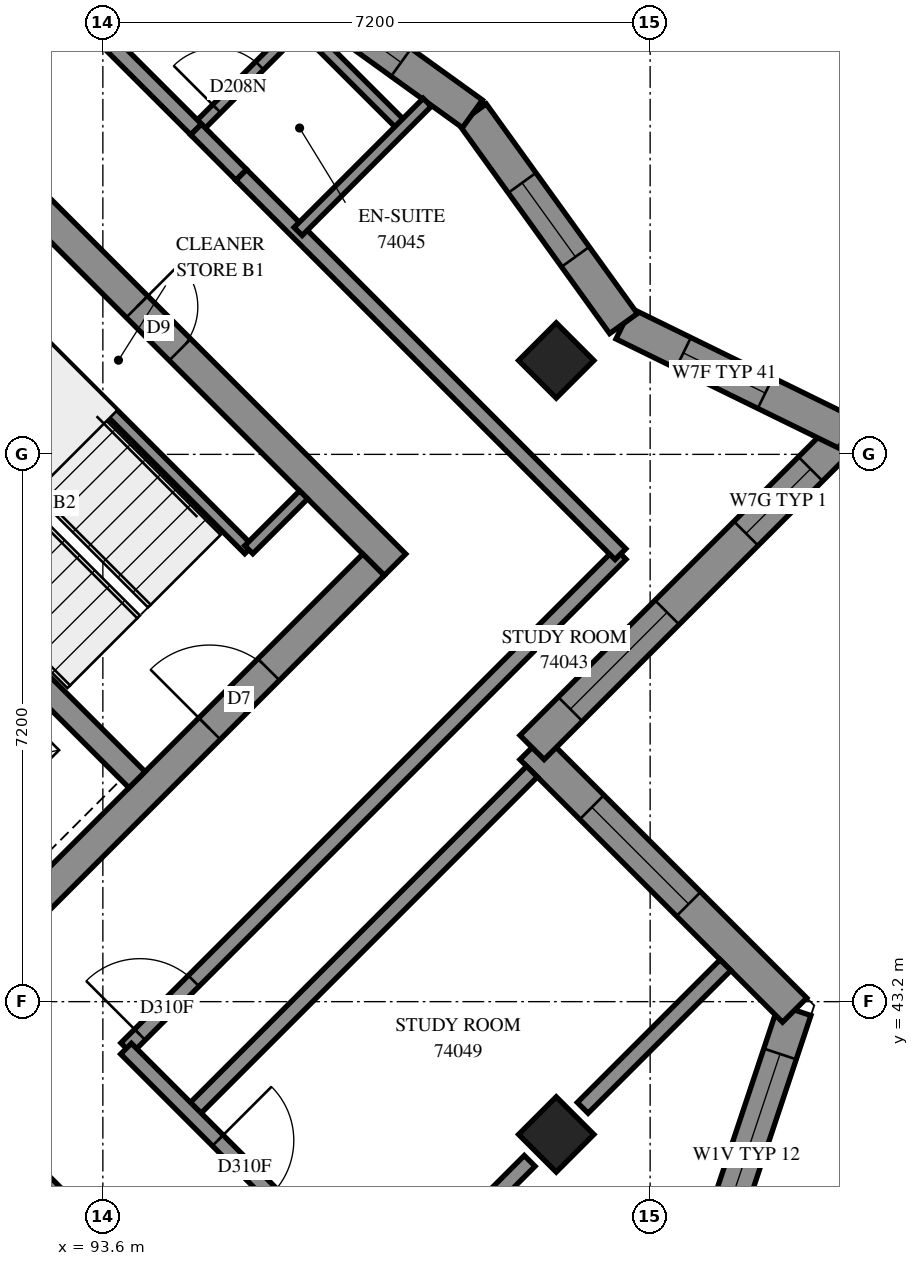
"""IFC4 building model, lengths in metres.
Left out: names, types, materials, properties, quantities, classifications, styles, units other than length and angle.
Written with IfcOpenShell. Run it as: python <this file> out.ifc"""

import sys

from ifc_helpers import new_model, si_unit, direction, frame, frame_2d, origin, origin_2d, place, context, subcontext, project, spatial, polyline, rectangle, outline, extrude, element, fill, save


model = new_model("IFC4")
c1 = context("Model", 3, precision=1e-05, world=origin(), true_north=direction((0.0, 1.0)))
c2 = subcontext(c1, "Body", "Model", "MODEL_VIEW")
j1 = project(units=[si_unit("LENGTHUNIT", "METRE"), si_unit("PLANEANGLEUNIT", "RADIAN")], contexts=[c1])
p1 = place(None, origin())
s1 = spatial("IfcSite", under=j1, at=p1, CompositionType="ELEMENT")
p2 = place(p1, origin())
s2 = spatial("IfcBuilding", under=s1, at=p2, CompositionType="ELEMENT")
p3 = place(p2, frame((0.0, 0.0, 271.0)))
s3 = spatial("IfcBuildingStorey", under=s2, at=p3, CompositionType="ELEMENT", Elevation=271.0)
for number, where, z_axis, x_axis in (
    (1, (99.565, 51.635, 0.0), (0.0, 0.0, 1.0), (0.707, -0.707, 0.0)),
    (2, (99.565, 41.453, 0.0), (0.0, 0.0, 1.0), (0.707, -0.707, 0.0)),
):
    element("IfcColumn", number, at=place(p3, frame(where, z_axis=z_axis, x_axis=x_axis)), inside=s3, PredefinedType="COLUMN", context=c2, shape_type="SweptSolid", body=[
        extrude(rectangle(XDim=0.7, YDim=0.7, at=origin_2d()), origin(), (0.0, 0.0, 1.0), 3.1),
    ])
p4 = place(p3, frame((86.695, 59.696, -0.3), z_axis=(0.0, 0.0, 1.0), x_axis=(0.7071100706, -0.7071034917, 0.0)))
e3 = element("IfcWall", 3, at=p4, inside=s3, PredefinedType="SHEAR", context=c2, shape_type="SweptSolid", body=[
    extrude(rectangle(XDim=15.2, YDim=0.4, at=frame_2d((7.6, 0.0))), origin(), (0.0, 0.0, 1.0), 2.7),
])
p5 = place(p4, frame((10.4, 0.0, 0.3)))
e4 = element("IfcOpeningElement", 4, at=p5, cuts=e3, PredefinedType="OPENING", context=c2, shape_type="SweptSolid", body=[
    extrude(rectangle(XDim=0.8, YDim=2.1, at=frame_2d((0.4, 1.05))), frame((0.0, 0.21, 0.0), z_axis=(0.0, -1.0, 0.0), x_axis=(1.0, 0.0, 0.0)), (0.0, 0.0, 1.0), 0.42),
])
p6 = place(p3, frame((86.978, 38.766, -0.3), z_axis=(0.0, 0.0, 1.0), x_axis=(0.7071067812, 0.7071067812, 0.0)))
e5 = element("IfcWall", 5, at=p6, inside=s3, PredefinedType="SHEAR", context=c2, shape_type="SweptSolid", body=[
    extrude(rectangle(XDim=14.4, YDim=0.4, at=frame_2d((7.2, 0.0))), origin(), (0.0, 0.0, 1.0), 2.7),
])
p7 = place(p6, frame((4.55, 0.0, 0.3)))
e6 = element("IfcOpeningElement", 6, at=p7, cuts=e5, PredefinedType="OPENING", context=c2, shape_type="SweptSolid", body=[
    extrude(rectangle(XDim=1.1, YDim=2.1, at=frame_2d((0.55, 1.05))), frame((0.0, 0.21, 0.0), z_axis=(0.0, -1.0, 0.0), x_axis=(1.0, 0.0, 0.0)), (0.0, 0.0, 1.0), 0.42),
])
p8 = place(p6, frame((11.35, 0.0, 0.3)))
e7 = element("IfcOpeningElement", 7, at=p8, cuts=e5, PredefinedType="OPENING", context=c2, shape_type="SweptSolid", body=[
    extrude(rectangle(XDim=1.1, YDim=2.1, at=frame_2d((0.55, 1.05))), frame((0.0, 0.21, 0.0), z_axis=(0.0, -1.0, 0.0), x_axis=(1.0, 0.0, 0.0)), (0.0, 0.0, 1.0), 0.42),
])
p9 = place(p3, frame((88.958, 51.211, 0.0), z_axis=(0.0, 0.0, 1.0), x_axis=(0.7070998367, -0.7071137256, 0.0)))
e8 = element("IfcWall", 8, at=p9, inside=s3, PredefinedType="SOLIDWALL", context=c2, shape_type="SweptSolid", body=[
    extrude(rectangle(XDim=7.2, YDim=0.3, at=frame_2d((3.6, 0.0))), origin(), (0.0, 0.0, 1.0), 3.1),
])
p10 = place(p3, frame((101.082, 38.232, 0.0), z_axis=(0.0, 0.0, 1.0), x_axis=(0.316227766, 0.9486832981, 0.0)))
e9 = element("IfcWall", 9, at=p10, inside=s3, PredefinedType="SOLIDWALL", context=c2, shape_type="SweptSolid", body=[
    extrude(outline(polyline([(-0.108, -0.225), (5.259, -0.225), (4.981, 0.225), (0.108, 0.225), (-0.108, -0.225)])), origin(), (0.0, 0.0, 1.0), 3.1),
])
p11 = place(p10, frame((1.711, 0.0, 0.45)))
e10 = element("IfcOpeningElement", 10, at=p11, cuts=e9, PredefinedType="OPENING", context=c2, shape_type="SweptSolid", body=[
    extrude(rectangle(XDim=2.8, YDim=2.55, at=frame_2d((1.4, 1.275))), frame((0.0, 0.235, 0.0), z_axis=(0.0, -1.0, 0.0), x_axis=(1.0, 0.0, 0.0)), (0.0, 0.0, 1.0), 0.47),
])
p12 = place(p3, frame((102.701, 43.089, 0.0), z_axis=(0.0, 0.0, 1.0), x_axis=(-0.7070965479, 0.7071170144, 0.0)))
e11 = element("IfcWall", 11, at=p12, inside=s3, PredefinedType="SOLIDWALL", context=c2, shape_type="SweptSolid", body=[
    extrude(outline(polyline([(-0.139, -0.225), (4.661, -0.225), (5.111, 0.225), (0.139, 0.225), (-0.139, -0.225)])), origin(), (0.0, 0.0, 1.0), 3.1),
])
p13 = place(p12, frame((1.974, 0.0, 0.6)))
e12 = element("IfcOpeningElement", 12, at=p13, cuts=e11, PredefinedType="OPENING", context=c2, shape_type="SweptSolid", body=[
    extrude(rectangle(XDim=1.8, YDim=1.9, at=frame_2d((0.9, 0.95))), frame((0.0, 0.235, 0.0), z_axis=(0.0, -1.0, 0.0), x_axis=(1.0, 0.0, 0.0)), (0.0, 0.0, 1.0), 0.47),
])
p14 = place(p3, frame((99.246, 46.544, 0.0), z_axis=(0.0, 0.0, 1.0), x_axis=(0.7071067812, 0.7071067812, 0.0)))
e13 = element("IfcWall", 13, at=p14, inside=s3, PredefinedType="SOLIDWALL", context=c2, shape_type="SweptSolid", body=[
    extrude(outline(polyline([(0.225, -0.225), (6.167, -0.225), (5.537, 0.225), (-0.225, 0.225), (0.225, -0.225)])), origin(), (0.0, 0.0, 1.0), 3.1),
])
p15 = place(p14, frame((0.713, 0.0, 0.6)))
e14 = element("IfcOpeningElement", 14, at=p15, cuts=e13, PredefinedType="OPENING", context=c2, shape_type="SweptSolid", body=[
    extrude(rectangle(XDim=1.8, YDim=1.9, at=frame_2d((0.9, 0.95))), frame((0.0, 0.235, 0.0), z_axis=(0.0, -1.0, 0.0), x_axis=(1.0, 0.0, 0.0)), (0.0, 0.0, 1.0), 0.47),
])
p16 = place(p14, frame((3.981, 0.0, 0.6)))
e15 = element("IfcOpeningElement", 15, at=p16, cuts=e13, PredefinedType="OPENING", context=c2, shape_type="SweptSolid", body=[
    extrude(rectangle(XDim=1.2, YDim=1.9, at=frame_2d((0.6, 0.95))), frame((0.0, 0.235, 0.0), z_axis=(0.0, -1.0, 0.0), x_axis=(1.0, 0.0, 0.0)), (0.0, 0.0, 1.0), 0.47),
])
p17 = place(p3, frame((103.385, 50.682, 0.0), z_axis=(0.0, 0.0, 1.0), x_axis=(-0.8979600771, 0.440076925, 0.0)))
e16 = element("IfcWall", 16, at=p17, inside=s3, PredefinedType="SOLIDWALL", context=c2, shape_type="SweptSolid", body=[
    extrude(outline(polyline([(-0.315, -0.225), (3.212, -0.225), (3.325, 0.225), (0.315, 0.225), (-0.315, -0.225)])), origin(), (0.0, 0.0, 1.0), 3.1),
])
p18 = place(p17, frame((1.192, 0.0, 0.45)))
e17 = element("IfcOpeningElement", 17, at=p18, cuts=e16, PredefinedType="OPENING", context=c2, shape_type="SweptSolid", body=[
    extrude(rectangle(XDim=1.2, YDim=2.55, at=frame_2d((0.6, 1.275))), frame((0.0, 0.235, 0.0), z_axis=(0.0, -1.0, 0.0), x_axis=(1.0, 0.0, 0.0)), (0.0, 0.0, 1.0), 0.47),
])
p19 = place(p3, frame((100.45, 52.121, 0.0), z_axis=(0.0, 0.0, 1.0), x_axis=(-0.5846130088, 0.8113122888, 0.0)))
e18 = element("IfcWall", 18, at=p19, inside=s3, PredefinedType="SOLIDWALL", context=c2, shape_type="SweptSolid", body=[
    extrude(outline(polyline([(0.056, -0.225), (3.437, -0.225), (3.364, 0.225), (-0.056, 0.225), (0.056, -0.225)])), origin(), (0.0, 0.0, 1.0), 3.1),
])
p20 = place(p19, frame((1.082, 0.0, 0.45)))
e19 = element("IfcOpeningElement", 19, at=p20, cuts=e18, PredefinedType="OPENING", context=c2, shape_type="SweptSolid", body=[
    extrude(rectangle(XDim=1.2, YDim=2.55, at=frame_2d((0.6, 1.275))), frame((0.0, 0.235, 0.0), z_axis=(0.0, -1.0, 0.0), x_axis=(1.0, 0.0, 0.0)), (0.0, 0.0, 1.0), 0.47),
])
p21 = place(p3, frame((98.462, 54.88, 0.0), z_axis=(0.0, 0.0, 1.0), x_axis=(-0.8113121077, 0.5846132601, 0.0)))
e20 = element("IfcWall", 20, at=p21, inside=s3, PredefinedType="SOLIDWALL", context=c2, shape_type="SweptSolid", body=[
    extrude(outline(polyline([(-0.036, -0.225), (3.344, -0.225), (3.417, 0.225), (0.036, 0.225), (-0.036, -0.225)])), origin(), (0.0, 0.0, 1.0), 3.1),
])
p22 = place(p21, frame((1.157, 0.0, 0.45)))
e21 = element("IfcOpeningElement", 21, at=p22, cuts=e20, PredefinedType="OPENING", context=c2, shape_type="SweptSolid", body=[
    extrude(rectangle(XDim=1.2, YDim=2.55, at=frame_2d((0.6, 1.275))), frame((0.0, 0.235, 0.0), z_axis=(0.0, -1.0, 0.0), x_axis=(1.0, 0.0, 0.0)), (0.0, 0.0, 1.0), 0.47),
])
p23 = place(p3, frame((91.313, 53.354, 0.0), z_axis=(0.0, 0.0, 1.0), x_axis=(0.7071067812, -0.7071067812, 0.0)))
e22 = element("IfcWall", 22, at=p23, inside=s3, PredefinedType="PARTITIONING", context=c2, shape_type="SweptSolid", body=[
    extrude(rectangle(XDim=5.95, YDim=0.15, at=frame_2d((2.975, 0.0))), origin(), (0.0, 0.0, 1.0), 3.1),
])
p24 = place(p3, frame((95.52, 49.146, 0.0), z_axis=(0.0, 0.0, 1.0), x_axis=(0.7071067812, 0.7071067812, 0.0)))
e23 = element("IfcWall", 23, at=p24, inside=s3, PredefinedType="PARTITIONING", context=c2, shape_type="SweptSolid", body=[
    extrude(rectangle(XDim=1.02, YDim=0.15, at=frame_2d((0.51, 0.0))), origin(), (0.0, 0.0, 1.0), 3.1),
])
p25 = place(p3, frame((93.908, 42.586, 0.0), z_axis=(0.0, 0.0, 1.0), x_axis=(0.7071067812, 0.7071067812, 0.0)))
e24 = element("IfcWall", 24, at=p25, inside=s3, PredefinedType="PARTITIONING", context=c2, shape_type="SweptSolid", body=[
    extrude(rectangle(XDim=9.198, YDim=0.2, at=frame_2d((4.599, 0.0))), origin(), (0.0, 0.0, 1.0), 3.1),
])
p26 = place(p25, frame((0.254, 0.0, 0.0)))
e25 = element("IfcOpeningElement", 25, at=p26, cuts=e24, PredefinedType="OPENING", context=c2, shape_type="SweptSolid", body=[
    extrude(rectangle(XDim=1.0, YDim=2.1, at=frame_2d((0.5, 1.05))), frame((0.0, 0.11, 0.0), z_axis=(0.0, -1.0, 0.0), x_axis=(1.0, 0.0, 0.0)), (0.0, 0.0, 1.0), 0.22),
])
p27 = place(p3, frame((95.419, 54.077, 0.0), z_axis=(0.0, 0.0, 1.0), x_axis=(0.7071067812, -0.7071067812, 0.0)))
e26 = element("IfcWall", 26, at=p27, inside=s3, PredefinedType="PARTITIONING", context=c2, shape_type="SweptSolid", body=[
    extrude(rectangle(XDim=7.057, YDim=0.2, at=frame_2d((3.528, 0.0))), origin(), (0.0, 0.0, 1.0), 3.1),
])
p28 = place(p3, frame((94.755, 41.737, 0.0), z_axis=(0.0, 0.0, 1.0), x_axis=(0.7071146549, 0.7070989073, 0.0)))
e27 = element("IfcWall", 27, at=p28, inside=s3, PredefinedType="PARTITIONING", context=c2, shape_type="SweptSolid", body=[
    extrude(rectangle(XDim=6.35, YDim=0.2, at=frame_2d((3.175, 0.0))), origin(), (0.0, 0.0, 1.0), 3.1),
])
p29 = place(p3, frame((93.905, 42.581, 0.0), z_axis=(0.0, 0.0, 1.0), x_axis=(0.7071067812, -0.7071067812, 0.0)))
e28 = element("IfcWall", 28, at=p29, inside=s3, PredefinedType="PARTITIONING", context=c2, shape_type="SweptSolid", body=[
    extrude(rectangle(XDim=4.8, YDim=0.2, at=frame_2d((2.4, 0.0))), origin(), (0.0, 0.0, 1.0), 3.1),
])
p30 = place(p29, frame((1.707, 0.0, 0.0)))
e29 = element("IfcOpeningElement", 29, at=p30, cuts=e28, PredefinedType="OPENING", context=c2, shape_type="SweptSolid", body=[
    extrude(rectangle(XDim=1.0, YDim=2.1, at=frame_2d((0.5, 1.05))), frame((0.0, 0.11, 0.0), z_axis=(0.0, -1.0, 0.0), x_axis=(1.0, 0.0, 0.0)), (0.0, 0.0, 1.0), 0.22),
])
p31 = place(p3, frame((92.491, 41.167, 0.0), z_axis=(0.0, 0.0, 1.0), x_axis=(0.7071067812, -0.7071067812, 0.0)))
e30 = element("IfcWall", 30, at=p31, inside=s3, PredefinedType="PARTITIONING", context=c2, shape_type="SweptSolid", body=[
    extrude(rectangle(XDim=4.8, YDim=0.2, at=frame_2d((2.4, 0.0))), origin(), (0.0, 0.0, 1.0), 3.1),
])
p32 = place(p31, frame((1.767, 0.0, 0.0)))
e31 = element("IfcOpeningElement", 31, at=p32, cuts=e30, PredefinedType="OPENING", context=c2, shape_type="SweptSolid", body=[
    extrude(rectangle(XDim=1.0, YDim=2.1, at=frame_2d((0.5, 1.05))), frame((0.0, 0.11, 0.0), z_axis=(0.0, -1.0, 0.0), x_axis=(1.0, 0.0, 0.0)), (0.0, 0.0, 1.0), 0.22),
])
p33 = place(p3, frame((95.602, 56.653, 0.0), z_axis=(0.0, 0.0, 1.0), x_axis=(0.7076157525, -0.7065974433, 0.0)))
e32 = element("IfcWall", 32, at=p33, inside=s3, PredefinedType="PARTITIONING", context=c2, shape_type="SweptSolid", body=[
    extrude(rectangle(XDim=2.75, YDim=0.15, at=frame_2d((1.375, 0.0))), origin(), (0.0, 0.0, 1.0), 3.1),
])
p34 = place(p3, frame((97.301, 39.191, 0.0), z_axis=(0.0, 0.0, 1.0), x_axis=(0.7071067812, 0.7071067812, 0.0)))
e33 = element("IfcWall", 33, at=p34, inside=s3, PredefinedType="PARTITIONING", context=c2, shape_type="SweptSolid", body=[
    extrude(rectangle(XDim=2.707, YDim=0.2, at=frame_2d((1.353, 0.0))), origin(), (0.0, 0.0, 1.0), 2.6),
])
p35 = place(p3, frame((99.913, 41.803, 0.0), z_axis=(0.0, 0.0, 1.0), x_axis=(0.7071067812, 0.7071067812, 0.0)))
e34 = element("IfcWall", 34, at=p35, inside=s3, PredefinedType="PARTITIONING", context=c2, shape_type="SweptSolid", body=[
    extrude(rectangle(XDim=2.656, YDim=0.2, at=frame_2d((1.328, 0.0))), origin(), (0.0, 0.0, 1.0), 3.1),
])
p36 = place(p3, frame((96.169, 53.333, 0.0), z_axis=(0.0, 0.0, 1.0), x_axis=(0.7071067812, 0.7071067812, 0.0)))
e35 = element("IfcWall", 35, at=p36, inside=s3, PredefinedType="PARTITIONING", context=c2, shape_type="SweptSolid", body=[
    extrude(rectangle(XDim=2.401, YDim=0.15, at=frame_2d((1.201, 0.0))), origin(), (0.0, 0.0, 1.0), 3.1),
])
p37 = place(p3, frame((94.827, 54.677, 0.0), z_axis=(0.0, 0.0, 1.0), x_axis=(0.7070828702, 0.7071306913, 0.0)))
e36 = element("IfcWall", 36, at=p37, inside=s3, PredefinedType="PARTITIONING", context=c2, shape_type="SweptSolid", body=[
    extrude(rectangle(XDim=2.091, YDim=0.15, at=frame_2d((1.046, 0.0))), origin(), (0.0, 0.0, 1.0), 3.1),
])
p38 = place(p37, frame((0.383, 0.0, 0.0)))
e37 = element("IfcOpeningElement", 37, at=p38, cuts=e36, PredefinedType="OPENING", context=c2, shape_type="SweptSolid", body=[
    extrude(rectangle(XDim=0.8, YDim=2.1, at=frame_2d((0.4, 1.05))), frame((0.0, 0.085, 0.0), z_axis=(0.0, -1.0, 0.0), x_axis=(1.0, 0.0, 0.0)), (0.0, 0.0, 1.0), 0.17),
])
p39 = place(p3, frame((93.623, 55.877, 0.0), z_axis=(0.0, 0.0, 1.0), x_axis=(0.7076943229, -0.7065187509, 0.0)))
e38 = element("IfcWall", 38, at=p39, inside=s3, PredefinedType="PARTITIONING", context=c2, shape_type="SweptSolid", body=[
    extrude(rectangle(XDim=1.701, YDim=0.2, at=frame_2d((0.851, 0.0))), origin(), (0.0, 0.0, 1.0), 3.1),
])
p40 = place(p3, frame((94.826, 54.674, 0.0), z_axis=(0.0, 0.0, 1.0), x_axis=(0.7059173694, -0.7082941956, 0.0)))
e39 = element("IfcWall", 39, at=p40, inside=s3, PredefinedType="PARTITIONING", context=c2, shape_type="SweptSolid", body=[
    extrude(rectangle(XDim=0.842, YDim=0.2, at=frame_2d((0.421, 0.0))), origin(), (0.0, 0.0, 1.0), 3.1),
])
p41 = place(p11, origin())
e40 = element("IfcWindow", 40, at=p41, inside=s3, PartitioningType="SINGLE_PANEL", PredefinedType="WINDOW", context=c2, shape_type="SweptSolid", body=[
    extrude(rectangle(XDim=2.8, YDim=2.55, at=frame_2d((1.4, 1.275))), frame((0.0, 0.205, 0.0), z_axis=(0.0, -1.0, 0.0), x_axis=(1.0, 0.0, 0.0)), (0.0, 0.0, 1.0), 0.06),
])
fill(e10, e40)
p42 = place(p13, origin())
e41 = element("IfcWindow", 41, at=p42, inside=s3, PartitioningType="SINGLE_PANEL", PredefinedType="WINDOW", context=c2, shape_type="SweptSolid", body=[
    extrude(rectangle(XDim=1.8, YDim=1.9, at=frame_2d((0.9, 0.95))), frame((0.0, 0.205, 0.0), z_axis=(0.0, -1.0, 0.0), x_axis=(1.0, 0.0, 0.0)), (0.0, 0.0, 1.0), 0.06),
])
fill(e12, e41)
p43 = place(p15, origin())
e42 = element("IfcWindow", 42, at=p43, inside=s3, PartitioningType="SINGLE_PANEL", PredefinedType="WINDOW", context=c2, shape_type="SweptSolid", body=[
    extrude(rectangle(XDim=1.8, YDim=1.9, at=frame_2d((0.9, 0.95))), frame((0.0, 0.205, 0.0), z_axis=(0.0, -1.0, 0.0), x_axis=(1.0, 0.0, 0.0)), (0.0, 0.0, 1.0), 0.06),
])
fill(e14, e42)
p44 = place(p16, origin())
e43 = element("IfcWindow", 43, at=p44, inside=s3, PartitioningType="SINGLE_PANEL", PredefinedType="WINDOW", context=c2, shape_type="SweptSolid", body=[
    extrude(rectangle(XDim=1.2, YDim=1.9, at=frame_2d((0.6, 0.95))), frame((0.0, 0.205, 0.0), z_axis=(0.0, -1.0, 0.0), x_axis=(1.0, 0.0, 0.0)), (0.0, 0.0, 1.0), 0.06),
])
fill(e15, e43)
p45 = place(p18, origin())
e44 = element("IfcWindow", 44, at=p45, inside=s3, PartitioningType="SINGLE_PANEL", PredefinedType="WINDOW", context=c2, shape_type="SweptSolid", body=[
    extrude(rectangle(XDim=1.2, YDim=2.55, at=frame_2d((0.6, 1.275))), frame((0.0, 0.205, 0.0), z_axis=(0.0, -1.0, 0.0), x_axis=(1.0, 0.0, 0.0)), (0.0, 0.0, 1.0), 0.06),
])
fill(e17, e44)
p46 = place(p20, origin())
e45 = element("IfcWindow", 45, at=p46, inside=s3, PartitioningType="SINGLE_PANEL", PredefinedType="WINDOW", context=c2, shape_type="SweptSolid", body=[
    extrude(rectangle(XDim=1.2, YDim=2.55, at=frame_2d((0.6, 1.275))), frame((0.0, 0.205, 0.0), z_axis=(0.0, -1.0, 0.0), x_axis=(1.0, 0.0, 0.0)), (0.0, 0.0, 1.0), 0.06),
])
fill(e19, e45)
p47 = place(p22, origin())
e46 = element("IfcWindow", 46, at=p47, inside=s3, PartitioningType="SINGLE_PANEL", PredefinedType="WINDOW", context=c2, shape_type="SweptSolid", body=[
    extrude(rectangle(XDim=1.2, YDim=2.55, at=frame_2d((0.6, 1.275))), frame((0.0, 0.205, 0.0), z_axis=(0.0, -1.0, 0.0), x_axis=(1.0, 0.0, 0.0)), (0.0, 0.0, 1.0), 0.06),
])
fill(e21, e46)
p48 = place(p5, origin())
e47 = element("IfcDoor", 47, at=p48, inside=s3, OperationType="SINGLE_SWING_RIGHT", PredefinedType="DOOR", context=c2, shape_type="SweptSolid", body=[
    extrude(rectangle(XDim=0.8, YDim=2.1, at=frame_2d((0.4, 1.05))), frame((0.0, 0.025, 0.0), z_axis=(0.0, -1.0, 0.0), x_axis=(1.0, 0.0, 0.0)), (0.0, 0.0, 1.0), 0.05),
])
fill(e4, e47)
p49 = place(p8, origin())
e48 = element("IfcDoor", 48, at=p49, inside=s3, OperationType="SINGLE_SWING_RIGHT", PredefinedType="DOOR", context=c2, shape_type="SweptSolid", body=[
    extrude(rectangle(XDim=1.1, YDim=2.1, at=frame_2d((0.55, 1.05))), frame((0.0, 0.025, 0.0), z_axis=(0.0, -1.0, 0.0), x_axis=(1.0, 0.0, 0.0)), (0.0, 0.0, 1.0), 0.05),
])
fill(e7, e48)
p50 = place(p26, origin())
e49 = element("IfcDoor", 49, at=p50, inside=s3, OperationType="SINGLE_SWING_RIGHT", PredefinedType="DOOR", context=c2, shape_type="SweptSolid", body=[
    extrude(rectangle(XDim=1.0, YDim=2.1, at=frame_2d((0.5, 1.05))), frame((0.0, 0.025, 0.0), z_axis=(0.0, -1.0, 0.0), x_axis=(1.0, 0.0, 0.0)), (0.0, 0.0, 1.0), 0.05),
])
fill(e25, e49)
p51 = place(p38, origin())
e50 = element("IfcDoor", 50, at=p51, inside=s3, OperationType="SINGLE_SWING_RIGHT", PredefinedType="DOOR", context=c2, shape_type="SweptSolid", body=[
    extrude(rectangle(XDim=0.8, YDim=2.1, at=frame_2d((0.4, 1.05))), frame((0.0, 0.025, 0.0), z_axis=(0.0, -1.0, 0.0), x_axis=(1.0, 0.0, 0.0)), (0.0, 0.0, 1.0), 0.05),
])
fill(e37, e50)
p52 = place(p30, origin())
e51 = element("IfcDoor", 51, at=p52, inside=s3, OperationType="SINGLE_SWING_RIGHT", PredefinedType="DOOR", context=c2, shape_type="SweptSolid", body=[
    extrude(rectangle(XDim=1.0, YDim=2.1, at=frame_2d((0.5, 1.05))), frame((0.0, 0.025, 0.0), z_axis=(0.0, -1.0, 0.0), x_axis=(1.0, 0.0, 0.0)), (0.0, 0.0, 1.0), 0.05),
])
fill(e29, e51)
save(model, sys.argv[1])
